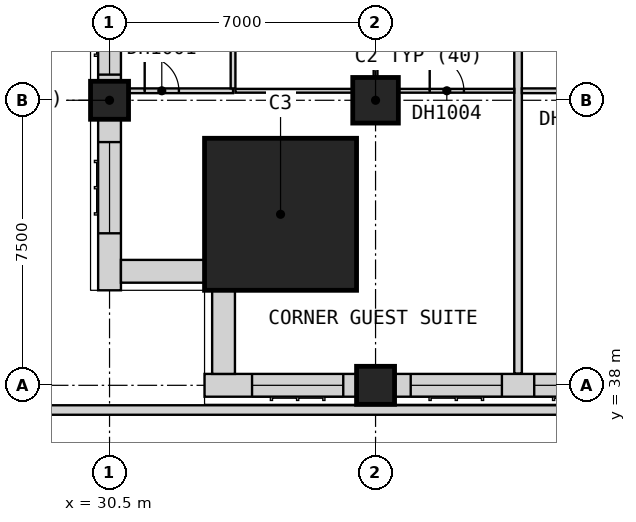
"""IFC4 building model, lengths in metres.
Left out: names, types, materials, properties, quantities, classifications, styles, units other than length and angle.
Written with IfcOpenShell. Run it as: python <this file> out.ifc"""

import sys

from ifc_helpers import new_model, si_unit, direction, frame, frame_2d, origin, origin_2d, place, context, subcontext, project, spatial, rectangle, extrude, element, fill, save


model = new_model("IFC4")
c1 = context("Model", 3, precision=1e-05, world=origin(), true_north=direction((0.0, 1.0)))
c2 = subcontext(c1, "Body", "Model", "MODEL_VIEW")
j1 = project(units=[si_unit("LENGTHUNIT", "METRE"), si_unit("PLANEANGLEUNIT", "RADIAN")], contexts=[c1])
p1 = place(None, origin())
s1 = spatial("IfcSite", under=j1, at=p1, CompositionType="ELEMENT")
p2 = place(p1, origin())
s2 = spatial("IfcBuilding", under=s1, at=p2, CompositionType="ELEMENT")
p3 = place(p2, frame((0.0, 0.0, 34.0)))
s3 = spatial("IfcBuildingStorey", under=s2, at=p3, CompositionType="ELEMENT", Elevation=34.0)
for number, where, z_axis, x_axis in (
    (1, (30.5, 45.5, 0.0), (0.0, 0.0, 1.0), (1.0, 0.0, 0.0)),
    (2, (37.5, 38.0, 0.0), (0.0, 0.0, 1.0), (1.0, 0.0, 0.0)),
):
    element("IfcColumn", number, at=place(p3, frame(where, z_axis=z_axis, x_axis=x_axis)), inside=s3, PredefinedType="COLUMN", context=c2, shape_type="SweptSolid", body=[
        extrude(rectangle(XDim=1.0, YDim=1.0, at=origin_2d()), origin(), (0.0, 0.0, 1.0), 3.6),
    ])
p4 = place(p3, frame((37.5, 45.5, 0.0), z_axis=(0.0, 0.0, 1.0), x_axis=(1.0, 0.0, 0.0)))
e3 = element("IfcColumn", 3, at=p4, inside=s3, PredefinedType="COLUMN", context=c2, shape_type="SweptSolid", body=[
    extrude(rectangle(XDim=1.2, YDim=1.2, at=origin_2d()), origin(), (0.0, 0.0, 1.0), 3.6),
])
p5 = place(p3, frame((35.0, 42.5, 0.0), z_axis=(0.0, 0.0, 1.0), x_axis=(1.0, 0.0, 0.0)))
e4 = element("IfcColumn", 4, at=p5, inside=s3, PredefinedType="COLUMN", context=c2, shape_type="SweptSolid", body=[
    extrude(rectangle(XDim=4.0, YDim=4.0, at=origin_2d()), origin(), (0.0, 0.0, 1.0), 3.6),
])
p6 = place(p3, frame((33.0, 38.0, 0.0), z_axis=(0.0, 0.0, 1.0), x_axis=(1.0, 0.0, 0.0)))
e5 = element("IfcWall", 5, at=p6, inside=s3, PredefinedType="SOLIDWALL", context=c2, shape_type="SweptSolid", body=[
    extrude(rectangle(XDim=4.0, YDim=0.6, at=frame_2d((2.0, 0.0))), origin(), (0.0, 0.0, 1.0), 3.35),
])
p7 = place(p6, frame((1.25, 0.0, 0.8)))
e6 = element("IfcOpeningElement", 6, at=p7, cuts=e5, PredefinedType="OPENING", context=c2, shape_type="SweptSolid", body=[
    extrude(rectangle(XDim=2.4, YDim=1.8, at=frame_2d((1.2, 0.9))), frame((0.0, 0.31, 0.0), z_axis=(0.0, -1.0, 0.0), x_axis=(1.0, 0.0, 0.0)), (0.0, 0.0, 1.0), 0.62),
])
p8 = place(p3, frame((38.0, 38.0, 0.0), z_axis=(0.0, 0.0, 1.0), x_axis=(1.0, 0.0, 0.0)))
e7 = element("IfcWall", 7, at=p8, inside=s3, PredefinedType="SOLIDWALL", context=c2, shape_type="SweptSolid", body=[
    extrude(rectangle(XDim=6.5, YDim=0.6, at=frame_2d((3.25, 0.0))), origin(), (0.0, 0.0, 1.0), 2.85),
])
p9 = place(p8, frame((0.425, 0.0, 0.8)))
e8 = element("IfcOpeningElement", 8, at=p9, cuts=e7, PredefinedType="OPENING", context=c2, shape_type="SweptSolid", body=[
    extrude(rectangle(XDim=2.4, YDim=1.8, at=frame_2d((1.2, 0.9))), frame((0.0, 0.31, 0.0), z_axis=(0.0, -1.0, 0.0), x_axis=(1.0, 0.0, 0.0)), (0.0, 0.0, 1.0), 0.62),
])
p10 = place(p8, frame((3.675, 0.0, 0.8)))
e9 = element("IfcOpeningElement", 9, at=p10, cuts=e7, PredefinedType="OPENING", context=c2, shape_type="SweptSolid", body=[
    extrude(rectangle(XDim=2.4, YDim=1.8, at=frame_2d((1.2, 0.9))), frame((0.0, 0.31, 0.0), z_axis=(0.0, -1.0, 0.0), x_axis=(1.0, 0.0, 0.0)), (0.0, 0.0, 1.0), 0.62),
])
p11 = place(p3, frame((30.5, 52.0, 0.0), z_axis=(0.0, 0.0, 1.0), x_axis=(0.0, -1.0, 0.0)))
e10 = element("IfcWall", 10, at=p11, inside=s3, PredefinedType="SOLIDWALL", context=c2, shape_type="SweptSolid", body=[
    extrude(rectangle(XDim=6.0, YDim=0.6, at=frame_2d((3.0, 0.0))), origin(), (0.0, 0.0, 1.0), 2.85),
])
p12 = place(p11, frame((3.425, 0.0, 0.8)))
e11 = element("IfcOpeningElement", 11, at=p12, cuts=e10, PredefinedType="OPENING", context=c2, shape_type="SweptSolid", body=[
    extrude(rectangle(XDim=2.4, YDim=1.8, at=frame_2d((1.2, 0.9))), frame((0.0, 0.31, 0.0), z_axis=(0.0, -1.0, 0.0), x_axis=(1.0, 0.0, 0.0)), (0.0, 0.0, 1.0), 0.62),
])
p13 = place(p11, frame((0.425, 0.0, 0.8)))
e12 = element("IfcOpeningElement", 12, at=p13, cuts=e10, PredefinedType="OPENING", context=c2, shape_type="SweptSolid", body=[
    extrude(rectangle(XDim=2.4, YDim=1.8, at=frame_2d((1.2, 0.9))), frame((0.0, 0.31, 0.0), z_axis=(0.0, -1.0, 0.0), x_axis=(1.0, 0.0, 0.0)), (0.0, 0.0, 1.0), 0.62),
])
p14 = place(p3, frame((30.5, 45.0, 0.0), z_axis=(0.0, 0.0, 1.0), x_axis=(0.0, -1.0, 0.0)))
e13 = element("IfcWall", 13, at=p14, inside=s3, PredefinedType="SOLIDWALL", context=c2, shape_type="SweptSolid", body=[
    extrude(rectangle(XDim=4.5, YDim=0.6, at=frame_2d((2.25, 0.0))), origin(), (0.0, 0.0, 1.0), 3.35),
])
p15 = place(p14, frame((0.6, 0.0, 0.8)))
e14 = element("IfcOpeningElement", 14, at=p15, cuts=e13, PredefinedType="OPENING", context=c2, shape_type="SweptSolid", body=[
    extrude(rectangle(XDim=2.4, YDim=1.8, at=frame_2d((1.2, 0.9))), frame((0.0, 0.31, 0.0), z_axis=(0.0, -1.0, 0.0), x_axis=(1.0, 0.0, 0.0)), (0.0, 0.0, 1.0), 0.62),
])
for number, where, z_axis, x_axis in (
    (15, (30.8, 41.0, 0.0), (0.0, 0.0, 1.0), (1.0, 0.0, 0.0)),
    (16, (33.5, 40.5, 0.0), (0.0, 0.0, 1.0), (0.0, -1.0, 0.0)),
):
    element("IfcWall", number, at=place(p3, frame(where, z_axis=z_axis, x_axis=x_axis)), inside=s3, PredefinedType="SOLIDWALL", context=c2, shape_type="SweptSolid", body=[
        extrude(rectangle(XDim=2.2, YDim=0.6, at=frame_2d((1.1, 0.0))), origin(), (0.0, 0.0, 1.0), 3.35),
    ])
p16 = place(p3, frame((41.25, 38.31, 0.0), z_axis=(0.0, 0.0, 1.0), x_axis=(0.0, 1.0, 0.0)))
e17 = element("IfcWall", 17, at=p16, inside=s3, PredefinedType="PARTITIONING", context=c2, shape_type="SweptSolid", body=[
    extrude(rectangle(XDim=11.715, YDim=0.2, at=frame_2d((5.857, 0.0))), origin(), (0.0, 0.0, 1.0), 3.35),
])
p17 = place(p3, frame((33.812, 45.75, 0.0), z_axis=(0.0, 0.0, 1.0), x_axis=(1.0, 0.0, 0.0)))
e18 = element("IfcWall", 18, at=p17, inside=s3, PredefinedType="PARTITIONING", context=c2, shape_type="SweptSolid", body=[
    extrude(rectangle(XDim=7.337, YDim=0.1, at=frame_2d((3.669, 0.0))), origin(), (0.0, 0.0, 1.0), 3.35),
])
p18 = place(p17, frame((5.113, 0.0, 0.0)))
e19 = element("IfcOpeningElement", 19, at=p18, cuts=e18, PredefinedType="OPENING", context=c2, shape_type="SweptSolid", body=[
    extrude(rectangle(XDim=0.9, YDim=2.1, at=frame_2d((0.45, 1.05))), frame((0.0, 0.06, 0.0), z_axis=(0.0, -1.0, 0.0), x_axis=(1.0, 0.0, 0.0)), (0.0, 0.0, 1.0), 0.12),
])
p19 = place(p3, frame((37.5, 45.8, 0.0), z_axis=(0.0, 0.0, 1.0), x_axis=(0.0, 1.0, 0.0)))
e20 = element("IfcWall", 20, at=p19, inside=s3, PredefinedType="PARTITIONING", context=c2, shape_type="SweptSolid", body=[
    extrude(rectangle(XDim=4.225, YDim=0.1, at=frame_2d((2.112, 0.0))), origin(), (0.0, 0.0, 1.0), 3.35),
])
p20 = place(p19, frame((1.675, 0.0, 0.0)))
e21 = element("IfcOpeningElement", 21, at=p20, cuts=e20, PredefinedType="OPENING", context=c2, shape_type="SweptSolid", body=[
    extrude(rectangle(XDim=0.9, YDim=2.1, at=frame_2d((0.45, 1.05))), frame((0.0, 0.06, 0.0), z_axis=(0.0, -1.0, 0.0), x_axis=(1.0, 0.0, 0.0)), (0.0, 0.0, 1.0), 0.12),
])
p21 = place(p3, frame((30.0, 45.75, 0.0), z_axis=(0.0, 0.0, 1.0), x_axis=(1.0, 0.0, 0.0)))
e22 = element("IfcWall", 22, at=p21, inside=s3, PredefinedType="PARTITIONING", context=c2, shape_type="SweptSolid", body=[
    extrude(rectangle(XDim=3.75, YDim=0.125, at=frame_2d((1.875, 0.0))), origin(), (0.0, 0.0, 1.0), 3.35),
])
p22 = place(p21, frame((1.425, 0.0, 0.0)))
e23 = element("IfcOpeningElement", 23, at=p22, cuts=e22, PredefinedType="OPENING", context=c2, shape_type="SweptSolid", body=[
    extrude(rectangle(XDim=0.9, YDim=2.1, at=frame_2d((0.45, 1.05))), frame((0.0, 0.073, 0.0), z_axis=(0.0, -1.0, 0.0), x_axis=(1.0, 0.0, 0.0)), (0.0, 0.0, 1.0), 0.145),
])
p23 = place(p3, frame((41.35, 45.75, 0.0), z_axis=(0.0, 0.0, 1.0), x_axis=(1.0, 0.0, 0.0)))
e24 = element("IfcWall", 24, at=p23, inside=s3, PredefinedType="PARTITIONING", context=c2, shape_type="SweptSolid", body=[
    extrude(rectangle(XDim=4.4, YDim=0.125, at=frame_2d((2.2, 0.0))), origin(), (0.0, 0.0, 1.0), 3.35),
])
p24 = place(p23, frame((1.7, 0.0, 0.0)))
e25 = element("IfcOpeningElement", 25, at=p24, cuts=e24, PredefinedType="OPENING", context=c2, shape_type="SweptSolid", body=[
    extrude(rectangle(XDim=0.9, YDim=2.1, at=frame_2d((0.45, 1.05))), frame((0.0, 0.073, 0.0), z_axis=(0.0, -1.0, 0.0), x_axis=(1.0, 0.0, 0.0)), (0.0, 0.0, 1.0), 0.145),
])
p25 = place(p3, frame((33.75, 45.812, 0.0), z_axis=(0.0, 0.0, 1.0), x_axis=(0.0, 1.0, 0.0)))
e26 = element("IfcWall", 26, at=p25, inside=s3, PredefinedType="PARTITIONING", context=c2, shape_type="SweptSolid", body=[
    extrude(rectangle(XDim=4.212, YDim=0.125, at=frame_2d((2.106, 0.0))), origin(), (0.0, 0.0, 1.0), 3.35),
])
p26 = place(p3, frame((23.125, 37.35, 0.0), z_axis=(0.0, 0.0, 1.0), x_axis=(1.0, 0.0, 0.0)))
e27 = element("IfcWall", 27, at=p26, inside=s3, PredefinedType="PARAPET", context=c2, shape_type="SweptSolid", body=[
    extrude(rectangle(XDim=66.25, YDim=0.25, at=frame_2d((33.125, 0.0))), origin(), (0.0, 0.0, 1.0), 1.2),
])
p27 = place(p7, origin())
e28 = element("IfcWindow", 28, at=p27, inside=s3, PartitioningType="SINGLE_PANEL", PredefinedType="WINDOW", context=c2, shape_type="SweptSolid", body=[
    extrude(rectangle(XDim=2.4, YDim=1.8, at=frame_2d((1.2, 0.9))), frame((0.0, -0.07, 0.0), z_axis=(0.0, -1.0, 0.0), x_axis=(1.0, 0.0, 0.0)), (0.0, 0.0, 1.0), 0.06),
])
fill(e6, e28)
p28 = place(p9, origin())
e29 = element("IfcWindow", 29, at=p28, inside=s3, PartitioningType="SINGLE_PANEL", PredefinedType="WINDOW", context=c2, shape_type="SweptSolid", body=[
    extrude(rectangle(XDim=2.4, YDim=1.8, at=frame_2d((1.2, 0.9))), frame((0.0, -0.07, 0.0), z_axis=(0.0, -1.0, 0.0), x_axis=(1.0, 0.0, 0.0)), (0.0, 0.0, 1.0), 0.06),
])
fill(e8, e29)
p29 = place(p10, origin())
e30 = element("IfcWindow", 30, at=p29, inside=s3, PartitioningType="SINGLE_PANEL", PredefinedType="WINDOW", context=c2, shape_type="SweptSolid", body=[
    extrude(rectangle(XDim=2.4, YDim=1.8, at=frame_2d((1.2, 0.9))), frame((0.0, -0.07, 0.0), z_axis=(0.0, -1.0, 0.0), x_axis=(1.0, 0.0, 0.0)), (0.0, 0.0, 1.0), 0.06),
])
fill(e9, e30)
p30 = place(p12, origin())
e31 = element("IfcWindow", 31, at=p30, inside=s3, PartitioningType="SINGLE_PANEL", PredefinedType="WINDOW", context=c2, shape_type="SweptSolid", body=[
    extrude(rectangle(XDim=2.4, YDim=1.8, at=frame_2d((1.2, 0.9))), frame((0.0, -0.07, 0.0), z_axis=(0.0, -1.0, 0.0), x_axis=(1.0, 0.0, 0.0)), (0.0, 0.0, 1.0), 0.06),
])
fill(e11, e31)
p31 = place(p15, origin())
e32 = element("IfcWindow", 32, at=p31, inside=s3, PartitioningType="SINGLE_PANEL", PredefinedType="WINDOW", context=c2, shape_type="SweptSolid", body=[
    extrude(rectangle(XDim=2.4, YDim=1.8, at=frame_2d((1.2, 0.9))), frame((0.0, -0.07, 0.0), z_axis=(0.0, -1.0, 0.0), x_axis=(1.0, 0.0, 0.0)), (0.0, 0.0, 1.0), 0.06),
])
fill(e14, e32)
p32 = place(p22, origin())
e33 = element("IfcDoor", 33, at=p32, inside=s3, OperationType="SINGLE_SWING_LEFT", PredefinedType="DOOR", context=c2, shape_type="SweptSolid", body=[
    extrude(rectangle(XDim=0.9, YDim=2.1, at=frame_2d((0.45, 1.05))), frame((0.0, 0.025, 0.0), z_axis=(0.0, -1.0, 0.0), x_axis=(1.0, 0.0, 0.0)), (0.0, 0.0, 1.0), 0.05),
])
fill(e23, e33)
p33 = place(p18, origin())
e34 = element("IfcDoor", 34, at=p33, inside=s3, OperationType="SINGLE_SWING_LEFT", PredefinedType="DOOR", context=c2, shape_type="SweptSolid", body=[
    extrude(rectangle(XDim=0.9, YDim=2.1, at=frame_2d((0.45, 1.05))), frame((0.0, 0.025, 0.0), z_axis=(0.0, -1.0, 0.0), x_axis=(1.0, 0.0, 0.0)), (0.0, 0.0, 1.0), 0.05),
])
fill(e19, e34)
save(model, sys.argv[1])
